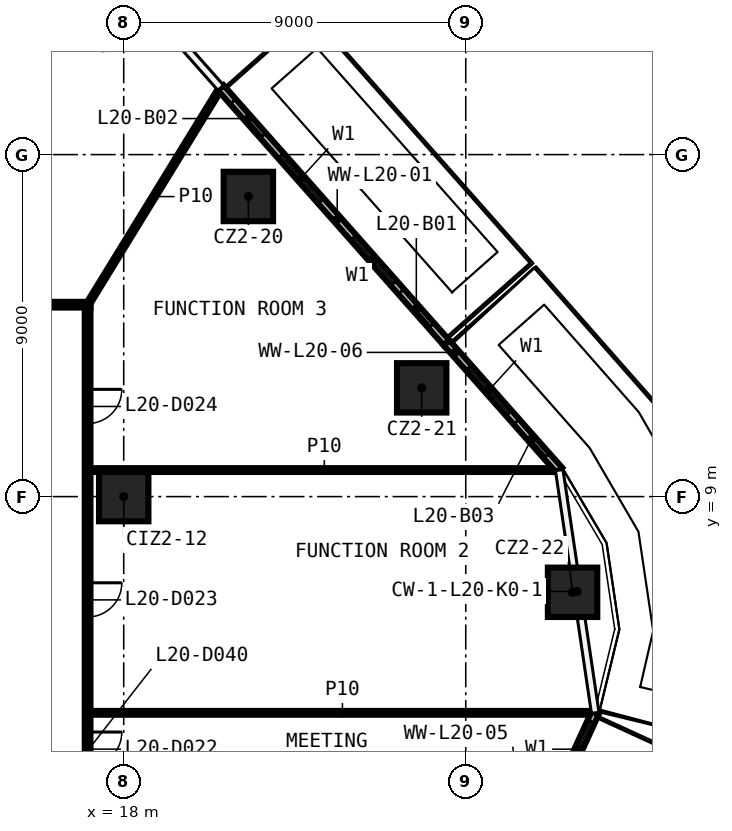
"""IFC4 building model, lengths in metres.
Left out: names, types, materials, properties, quantities, classifications, styles, units other than length and angle.
Written with IfcOpenShell. Run it as: python <this file> out.ifc"""

import sys

from ifc_helpers import new_model, si_unit, direction, frame, frame_2d, origin, origin_2d, place, context, subcontext, project, spatial, rectangle, extrude, element, fill, save


model = new_model("IFC4")
c1 = context("Model", 3, precision=1e-05, world=origin(), true_north=direction((0.0, 1.0)))
c2 = subcontext(c1, "Body", "Model", "MODEL_VIEW")
j1 = project(units=[si_unit("LENGTHUNIT", "METRE"), si_unit("PLANEANGLEUNIT", "RADIAN")], contexts=[c1])
p1 = place(None, origin())
s1 = spatial("IfcSite", under=j1, at=p1, CompositionType="ELEMENT")
p2 = place(p1, origin())
s2 = spatial("IfcBuilding", under=s1, at=p2, CompositionType="ELEMENT")
p3 = place(p2, frame((0.0, 0.0, 98.9)))
s3 = spatial("IfcBuildingStorey", under=s2, at=p3, CompositionType="ELEMENT", Elevation=98.9)
for number, where, z_axis, x_axis in (
    (1, (21.28, 16.898, 0.0), (0.0, 0.0, 1.0), (1.0, 0.0, 0.0)),
    (2, (25.841, 11.862, 0.0), (0.0, 0.0, 1.0), (1.0, 0.0, 0.0)),
    (3, (29.811, 6.482, 0.0), (0.0, 0.0, 1.0), (1.0, 0.0, 0.0)),
    (4, (18.0, 9.0, 0.0), (0.0, 0.0, 1.0), (1.0, 0.0, 0.0)),
):
    element("IfcColumn", number, at=place(p3, frame(where, z_axis=z_axis, x_axis=x_axis)), inside=s3, PredefinedType="COLUMN", context=c2, shape_type="SweptSolid", body=[
        extrude(rectangle(XDim=1.3, YDim=1.3, at=origin_2d()), origin(), (0.0, 0.0, 1.0), 3.25),
    ])
p4 = place(p3, frame((17.125, 3.31, 0.0), z_axis=(0.0, 0.0, 1.0), x_axis=(1.0, 0.0, 0.0)))
e5 = element("IfcWall", 5, at=p4, inside=s3, PredefinedType="PARTITIONING", context=c2, shape_type="SweptSolid", body=[
    extrude(rectangle(XDim=13.26, YDim=0.1, at=frame_2d((6.63, 0.0))), origin(), (0.0, 0.0, 1.0), 3.25),
])
p5 = place(p3, frame((17.125, 9.698, 0.0), z_axis=(0.0, 0.0, 1.0), x_axis=(1.0, 0.0, 0.0)))
e6 = element("IfcWall", 6, at=p5, inside=s3, PredefinedType="PARTITIONING", context=c2, shape_type="SweptSolid", body=[
    extrude(rectangle(XDim=12.308, YDim=0.1, at=frame_2d((6.154, 0.0))), origin(), (0.0, 0.0, 1.0), 3.25),
])
p6 = place(p3, frame((-17.125, 14.05, 0.0), z_axis=(0.0, 0.0, 1.0), x_axis=(1.0, 0.0, 0.0)))
e7 = element("IfcWall", 7, at=p6, inside=s3, PredefinedType="PARTITIONING", context=c2, shape_type="SweptSolid", body=[
    extrude(rectangle(XDim=34.25, YDim=0.15, at=frame_2d((17.125, 0.0))), origin(), (0.0, 0.0, 1.0), 3.25),
])
p7 = place(p6, frame((29.757, 0.0, 0.0)))
e8 = element("IfcOpeningElement", 8, at=p7, cuts=e7, PredefinedType="OPENING", context=c2, shape_type="SweptSolid", body=[
    extrude(rectangle(XDim=1.0, YDim=2.1, at=frame_2d((0.5, 1.05))), frame((0.0, 0.085, 0.0), z_axis=(0.0, -1.0, 0.0), x_axis=(1.0, 0.0, 0.0)), (0.0, 0.0, 1.0), 0.17),
])
p8 = place(p6, frame((18.682, 0.0, 0.0)))
e9 = element("IfcOpeningElement", 9, at=p8, cuts=e7, PredefinedType="OPENING", context=c2, shape_type="SweptSolid", body=[
    extrude(rectangle(XDim=1.0, YDim=2.1, at=frame_2d((0.5, 1.05))), frame((0.0, 0.085, 0.0), z_axis=(0.0, -1.0, 0.0), x_axis=(1.0, 0.0, 0.0)), (0.0, 0.0, 1.0), 0.17),
])
p9 = place(p6, frame((16.654, 0.0, 0.0)))
e10 = element("IfcOpeningElement", 10, at=p9, cuts=e7, PredefinedType="OPENING", context=c2, shape_type="SweptSolid", body=[
    extrude(rectangle(XDim=1.0, YDim=2.1, at=frame_2d((0.5, 1.05))), frame((0.0, 0.085, 0.0), z_axis=(0.0, -1.0, 0.0), x_axis=(1.0, 0.0, 0.0)), (0.0, 0.0, 1.0), 0.17),
])
p10 = place(p6, frame((9.827, 0.0, 0.0)))
e11 = element("IfcOpeningElement", 11, at=p10, cuts=e7, PredefinedType="OPENING", context=c2, shape_type="SweptSolid", body=[
    extrude(rectangle(XDim=1.0, YDim=2.1, at=frame_2d((0.5, 1.05))), frame((0.0, 0.085, 0.0), z_axis=(0.0, -1.0, 0.0), x_axis=(1.0, 0.0, 0.0)), (0.0, 0.0, 1.0), 0.17),
])
p11 = place(p6, frame((7.8, 0.0, 0.0)))
e12 = element("IfcOpeningElement", 12, at=p11, cuts=e7, PredefinedType="OPENING", context=c2, shape_type="SweptSolid", body=[
    extrude(rectangle(XDim=1.0, YDim=2.1, at=frame_2d((0.5, 1.05))), frame((0.0, 0.085, 0.0), z_axis=(0.0, -1.0, 0.0), x_axis=(1.0, 0.0, 0.0)), (0.0, 0.0, 1.0), 0.17),
])
p12 = place(p6, frame((2.56, 0.0, 0.0)))
e13 = element("IfcOpeningElement", 13, at=p12, cuts=e7, PredefinedType="OPENING", context=c2, shape_type="SweptSolid", body=[
    extrude(rectangle(XDim=0.9, YDim=2.1, at=frame_2d((0.45, 1.05))), frame((0.0, 0.085, 0.0), z_axis=(0.0, -1.0, 0.0), x_axis=(1.0, 0.0, 0.0)), (0.0, 0.0, 1.0), 0.17),
])
p13 = place(p3, frame((17.05, 14.05, 0.0), z_axis=(0.0, 0.0, 1.0), x_axis=(0.523105565691, 0.852267896346, 0.0)))
e14 = element("IfcWall", 14, at=p13, inside=s3, PredefinedType="PARTITIONING", context=c2, shape_type="SweptSolid", body=[
    extrude(rectangle(XDim=6.677, YDim=0.1, at=frame_2d((3.338, 0.0))), origin(), (0.0, 0.0, 1.0), 3.25),
])
p14 = place(p3, frame((17.05, 13.975, 0.0), z_axis=(0.0, 0.0, 1.0), x_axis=(0.0, -1.0, 0.0)))
e15 = element("IfcWall", 15, at=p14, inside=s3, PredefinedType="PARTITIONING", context=c2, shape_type="SweptSolid", body=[
    extrude(rectangle(XDim=27.95, YDim=0.15, at=frame_2d((13.975, 0.0))), origin(), (0.0, 0.0, 1.0), 3.25),
])
p15 = place(p14, frame((25.274, 0.0, 0.0)))
e16 = element("IfcOpeningElement", 16, at=p15, cuts=e15, PredefinedType="OPENING", context=c2, shape_type="SweptSolid", body=[
    extrude(rectangle(XDim=0.9, YDim=2.1, at=frame_2d((0.45, 1.05))), frame((0.0, 0.085, 0.0), z_axis=(0.0, -1.0, 0.0), x_axis=(1.0, 0.0, 0.0)), (0.0, 0.0, 1.0), 0.17),
])
p16 = place(p14, frame((18.854, 0.0, 0.0)))
e17 = element("IfcOpeningElement", 17, at=p16, cuts=e15, PredefinedType="OPENING", context=c2, shape_type="SweptSolid", body=[
    extrude(rectangle(XDim=1.0, YDim=2.1, at=frame_2d((0.5, 1.05))), frame((0.0, 0.085, 0.0), z_axis=(0.0, -1.0, 0.0), x_axis=(1.0, 0.0, 0.0)), (0.0, 0.0, 1.0), 0.17),
])
p17 = place(p14, frame((17.299, 0.0, 0.0)))
e18 = element("IfcOpeningElement", 18, at=p17, cuts=e15, PredefinedType="OPENING", context=c2, shape_type="SweptSolid", body=[
    extrude(rectangle(XDim=1.0, YDim=2.1, at=frame_2d((0.5, 1.05))), frame((0.0, 0.085, 0.0), z_axis=(0.0, -1.0, 0.0), x_axis=(1.0, 0.0, 0.0)), (0.0, 0.0, 1.0), 0.17),
])
p18 = place(p14, frame((11.171, 0.0, 0.0)))
e19 = element("IfcOpeningElement", 19, at=p18, cuts=e15, PredefinedType="OPENING", context=c2, shape_type="SweptSolid", body=[
    extrude(rectangle(XDim=0.9, YDim=2.1, at=frame_2d((0.45, 1.05))), frame((0.0, 0.085, 0.0), z_axis=(0.0, -1.0, 0.0), x_axis=(1.0, 0.0, 0.0)), (0.0, 0.0, 1.0), 0.17),
])
p19 = place(p14, frame((7.243, 0.0, 0.0)))
e20 = element("IfcOpeningElement", 20, at=p19, cuts=e15, PredefinedType="OPENING", context=c2, shape_type="SweptSolid", body=[
    extrude(rectangle(XDim=0.9, YDim=2.1, at=frame_2d((0.45, 1.05))), frame((0.0, 0.085, 0.0), z_axis=(0.0, -1.0, 0.0), x_axis=(1.0, 0.0, 0.0)), (0.0, 0.0, 1.0), 0.17),
])
p20 = place(p14, frame((2.153, 0.0, 0.0)))
e21 = element("IfcOpeningElement", 21, at=p20, cuts=e15, PredefinedType="OPENING", context=c2, shape_type="SweptSolid", body=[
    extrude(rectangle(XDim=0.9, YDim=2.1, at=frame_2d((0.45, 1.05))), frame((0.0, 0.085, 0.0), z_axis=(0.0, -1.0, 0.0), x_axis=(1.0, 0.0, 0.0)), (0.0, 0.0, 1.0), 0.17),
])
p21 = place(p3, frame((26.495, 13.046, 0.0), z_axis=(0.0, 0.0, 1.0), x_axis=(-0.662851206757, 0.748751145376, 0.0)))
e22 = element("IfcWall", 22, at=p21, inside=s3, PredefinedType="SOLIDWALL", context=c2, shape_type="SweptSolid", body=[
    extrude(rectangle(XDim=8.964, YDim=0.2, at=frame_2d((4.482, 0.0))), origin(), (0.0, 0.0, 1.0), 3.25),
])
p22 = place(p21, frame((2.1, 0.0, 0.6)))
e23 = element("IfcOpeningElement", 23, at=p22, cuts=e22, PredefinedType="OPENING", context=c2, shape_type="SweptSolid", body=[
    extrude(rectangle(XDim=1.6, YDim=2.4, at=frame_2d((0.8, 1.2))), frame((0.0, 0.11, 0.0), z_axis=(0.0, -1.0, 0.0), x_axis=(1.0, 0.0, 0.0)), (0.0, 0.0, 1.0), 0.22),
])
p23 = place(p21, frame((0.6, 0.0, 0.0)))
e24 = element("IfcOpeningElement", 24, at=p23, cuts=e22, PredefinedType="OPENING", context=c2, shape_type="SweptSolid", body=[
    extrude(rectangle(XDim=1.2, YDim=2.4, at=frame_2d((0.6, 1.2))), frame((0.0, 0.11, 0.0), z_axis=(0.0, -1.0, 0.0), x_axis=(1.0, 0.0, 0.0)), (0.0, 0.0, 1.0), 0.22),
])
p24 = place(p21, frame((4.982, 0.0, 0.6)))
e25 = element("IfcOpeningElement", 25, at=p24, cuts=e22, PredefinedType="OPENING", context=c2, shape_type="SweptSolid", body=[
    extrude(rectangle(XDim=1.6, YDim=2.4, at=frame_2d((0.8, 1.2))), frame((0.0, 0.11, 0.0), z_axis=(0.0, -1.0, 0.0), x_axis=(1.0, 0.0, 0.0)), (0.0, 0.0, 1.0), 0.22),
])
p25 = place(p21, frame((7.282, 0.0, 0.0)))
e26 = element("IfcOpeningElement", 26, at=p25, cuts=e22, PredefinedType="OPENING", context=c2, shape_type="SweptSolid", body=[
    extrude(rectangle(XDim=1.2, YDim=2.4, at=frame_2d((0.6, 1.2))), frame((0.0, 0.11, 0.0), z_axis=(0.0, -1.0, 0.0), x_axis=(1.0, 0.0, 0.0)), (0.0, 0.0, 1.0), 0.22),
])
p26 = place(p3, frame((29.46, 9.698, 0.0), z_axis=(0.0, 0.0, 1.0), x_axis=(-0.662868291848, 0.748736020011, 0.0)))
e27 = element("IfcWall", 27, at=p26, inside=s3, PredefinedType="SOLIDWALL", context=c2, shape_type="SweptSolid", body=[
    extrude(rectangle(XDim=4.472, YDim=0.2, at=frame_2d((2.236, 0.0))), origin(), (0.0, 0.0, 1.0), 3.25),
])
p27 = place(p26, frame((2.0, 0.0, 0.6)))
e28 = element("IfcOpeningElement", 28, at=p27, cuts=e27, PredefinedType="OPENING", context=c2, shape_type="SweptSolid", body=[
    extrude(rectangle(XDim=1.6, YDim=2.4, at=frame_2d((0.8, 1.2))), frame((0.0, 0.11, 0.0), z_axis=(0.0, -1.0, 0.0), x_axis=(1.0, 0.0, 0.0)), (0.0, 0.0, 1.0), 0.22),
])
p28 = place(p26, frame((0.5, 0.0, 0.0)))
e29 = element("IfcOpeningElement", 29, at=p28, cuts=e27, PredefinedType="OPENING", context=c2, shape_type="SweptSolid", body=[
    extrude(rectangle(XDim=1.2, YDim=2.4, at=frame_2d((0.6, 1.2))), frame((0.0, 0.11, 0.0), z_axis=(0.0, -1.0, 0.0), x_axis=(1.0, 0.0, 0.0)), (0.0, 0.0, 1.0), 0.22),
])
p29 = place(p3, frame((21.329, -16.468, 0.0), z_axis=(0.0, 0.0, 1.0), x_axis=(0.417117833448, 0.908852415423, 0.0)))
e30 = element("IfcWall", 30, at=p29, inside=s3, PredefinedType="SOLIDWALL", context=c2, shape_type="SweptSolid", body=[
    extrude(rectangle(XDim=21.761, YDim=0.2, at=frame_2d((10.881, 0.0))), origin(), (0.0, 0.0, 1.0), 3.25),
])
p30 = place(p29, frame((2.0, 0.0, 0.6)))
e31 = element("IfcOpeningElement", 31, at=p30, cuts=e30, PredefinedType="OPENING", context=c2, shape_type="SweptSolid", body=[
    extrude(rectangle(XDim=1.6, YDim=2.4, at=frame_2d((0.8, 1.2))), frame((0.0, 0.11, 0.0), z_axis=(0.0, -1.0, 0.0), x_axis=(1.0, 0.0, 0.0)), (0.0, 0.0, 1.0), 0.22),
])
p31 = place(p29, frame((0.5, 0.0, 0.0)))
e32 = element("IfcOpeningElement", 32, at=p31, cuts=e30, PredefinedType="OPENING", context=c2, shape_type="SweptSolid", body=[
    extrude(rectangle(XDim=1.2, YDim=2.4, at=frame_2d((0.6, 1.2))), frame((0.0, 0.11, 0.0), z_axis=(0.0, -1.0, 0.0), x_axis=(1.0, 0.0, 0.0)), (0.0, 0.0, 1.0), 0.22),
])
p32 = place(p29, frame((6.352, 0.0, 0.6)))
e33 = element("IfcOpeningElement", 33, at=p32, cuts=e30, PredefinedType="OPENING", context=c2, shape_type="SweptSolid", body=[
    extrude(rectangle(XDim=1.6, YDim=2.4, at=frame_2d((0.8, 1.2))), frame((0.0, 0.11, 0.0), z_axis=(0.0, -1.0, 0.0), x_axis=(1.0, 0.0, 0.0)), (0.0, 0.0, 1.0), 0.22),
])
p33 = place(p29, frame((4.852, 0.0, 0.0)))
e34 = element("IfcOpeningElement", 34, at=p33, cuts=e30, PredefinedType="OPENING", context=c2, shape_type="SweptSolid", body=[
    extrude(rectangle(XDim=1.2, YDim=2.4, at=frame_2d((0.6, 1.2))), frame((0.0, 0.11, 0.0), z_axis=(0.0, -1.0, 0.0), x_axis=(1.0, 0.0, 0.0)), (0.0, 0.0, 1.0), 0.22),
])
p34 = place(p29, frame((9.205, 0.0, 0.6)))
e35 = element("IfcOpeningElement", 35, at=p34, cuts=e30, PredefinedType="OPENING", context=c2, shape_type="SweptSolid", body=[
    extrude(rectangle(XDim=1.6, YDim=2.4, at=frame_2d((0.8, 1.2))), frame((0.0, 0.11, 0.0), z_axis=(0.0, -1.0, 0.0), x_axis=(1.0, 0.0, 0.0)), (0.0, 0.0, 1.0), 0.22),
])
p35 = place(p29, frame((11.205, 0.0, 0.0)))
e36 = element("IfcOpeningElement", 36, at=p35, cuts=e30, PredefinedType="OPENING", context=c2, shape_type="SweptSolid", body=[
    extrude(rectangle(XDim=1.2, YDim=2.4, at=frame_2d((0.6, 1.2))), frame((0.0, 0.11, 0.0), z_axis=(0.0, -1.0, 0.0), x_axis=(1.0, 0.0, 0.0)), (0.0, 0.0, 1.0), 0.22),
])
p36 = place(p29, frame((15.057, 0.0, 0.6)))
e37 = element("IfcOpeningElement", 37, at=p36, cuts=e30, PredefinedType="OPENING", context=c2, shape_type="SweptSolid", body=[
    extrude(rectangle(XDim=1.6, YDim=2.4, at=frame_2d((0.8, 1.2))), frame((0.0, 0.11, 0.0), z_axis=(0.0, -1.0, 0.0), x_axis=(1.0, 0.0, 0.0)), (0.0, 0.0, 1.0), 0.22),
])
p37 = place(p29, frame((13.557, 0.0, 0.0)))
e38 = element("IfcOpeningElement", 38, at=p37, cuts=e30, PredefinedType="OPENING", context=c2, shape_type="SweptSolid", body=[
    extrude(rectangle(XDim=1.2, YDim=2.4, at=frame_2d((0.6, 1.2))), frame((0.0, 0.11, 0.0), z_axis=(0.0, -1.0, 0.0), x_axis=(1.0, 0.0, 0.0)), (0.0, 0.0, 1.0), 0.22),
])
p38 = place(p29, frame((19.909, 0.0, 0.6)))
e39 = element("IfcOpeningElement", 39, at=p38, cuts=e30, PredefinedType="OPENING", context=c2, shape_type="SweptSolid", body=[
    extrude(rectangle(XDim=1.6, YDim=2.4, at=frame_2d((0.8, 1.2))), frame((0.0, 0.11, 0.0), z_axis=(0.0, -1.0, 0.0), x_axis=(1.0, 0.0, 0.0)), (0.0, 0.0, 1.0), 0.22),
])
p39 = place(p29, frame((18.409, 0.0, 0.0)))
e40 = element("IfcOpeningElement", 40, at=p39, cuts=e30, PredefinedType="OPENING", context=c2, shape_type="SweptSolid", body=[
    extrude(rectangle(XDim=1.2, YDim=2.4, at=frame_2d((0.6, 1.2))), frame((0.0, 0.11, 0.0), z_axis=(0.0, -1.0, 0.0), x_axis=(1.0, 0.0, 0.0)), (0.0, 0.0, 1.0), 0.22),
])
p40 = place(p18, origin())
e41 = element("IfcDoor", 41, at=p40, inside=s3, OperationType="SINGLE_SWING_RIGHT", PredefinedType="DOOR", context=c2, shape_type="SweptSolid", body=[
    extrude(rectangle(XDim=0.9, YDim=2.1, at=frame_2d((0.45, 1.05))), frame((0.0, 0.025, 0.0), z_axis=(0.0, -1.0, 0.0), x_axis=(1.0, 0.0, 0.0)), (0.0, 0.0, 1.0), 0.05),
])
fill(e19, e41)
p41 = place(p19, origin())
e42 = element("IfcDoor", 42, at=p41, inside=s3, OperationType="SINGLE_SWING_LEFT", PredefinedType="DOOR", context=c2, shape_type="SweptSolid", body=[
    extrude(rectangle(XDim=0.9, YDim=2.1, at=frame_2d((0.45, 1.05))), frame((0.0, 0.025, 0.0), z_axis=(0.0, -1.0, 0.0), x_axis=(1.0, 0.0, 0.0)), (0.0, 0.0, 1.0), 0.05),
])
fill(e20, e42)
p42 = place(p20, origin())
e43 = element("IfcDoor", 43, at=p42, inside=s3, OperationType="SINGLE_SWING_RIGHT", PredefinedType="DOOR", context=c2, shape_type="SweptSolid", body=[
    extrude(rectangle(XDim=0.9, YDim=2.1, at=frame_2d((0.45, 1.05))), frame((0.0, 0.025, 0.0), z_axis=(0.0, -1.0, 0.0), x_axis=(1.0, 0.0, 0.0)), (0.0, 0.0, 1.0), 0.05),
])
fill(e21, e43)
p43 = place(p22, origin())
e44 = element("IfcWindow", 44, at=p43, inside=s3, PartitioningType="SINGLE_PANEL", PredefinedType="WINDOW", context=c2, shape_type="SweptSolid", body=[
    extrude(rectangle(XDim=1.6, YDim=2.4, at=frame_2d((0.8, 1.2))), frame((0.0, 0.03, 0.0), z_axis=(0.0, -1.0, 0.0), x_axis=(1.0, 0.0, 0.0)), (0.0, 0.0, 1.0), 0.06),
])
fill(e23, e44)
p44 = place(p23, origin())
e45 = element("IfcDoor", 45, at=p44, inside=s3, OperationType="SLIDING_TO_LEFT", PredefinedType="DOOR", context=c2, shape_type="SweptSolid", body=[
    extrude(rectangle(XDim=1.2, YDim=2.4, at=frame_2d((0.6, 1.2))), frame((0.0, 0.025, 0.0), z_axis=(0.0, -1.0, 0.0), x_axis=(1.0, 0.0, 0.0)), (0.0, 0.0, 1.0), 0.05),
])
fill(e24, e45)
p45 = place(p24, origin())
e46 = element("IfcWindow", 46, at=p45, inside=s3, PartitioningType="SINGLE_PANEL", PredefinedType="WINDOW", context=c2, shape_type="SweptSolid", body=[
    extrude(rectangle(XDim=1.6, YDim=2.4, at=frame_2d((0.8, 1.2))), frame((0.0, 0.03, 0.0), z_axis=(0.0, -1.0, 0.0), x_axis=(1.0, 0.0, 0.0)), (0.0, 0.0, 1.0), 0.06),
])
fill(e25, e46)
p46 = place(p25, origin())
e47 = element("IfcDoor", 47, at=p46, inside=s3, OperationType="SLIDING_TO_LEFT", PredefinedType="DOOR", context=c2, shape_type="SweptSolid", body=[
    extrude(rectangle(XDim=1.2, YDim=2.4, at=frame_2d((0.6, 1.2))), frame((0.0, 0.025, 0.0), z_axis=(0.0, -1.0, 0.0), x_axis=(1.0, 0.0, 0.0)), (0.0, 0.0, 1.0), 0.05),
])
fill(e26, e47)
p47 = place(p27, origin())
e48 = element("IfcWindow", 48, at=p47, inside=s3, PartitioningType="SINGLE_PANEL", PredefinedType="WINDOW", context=c2, shape_type="SweptSolid", body=[
    extrude(rectangle(XDim=1.6, YDim=2.4, at=frame_2d((0.8, 1.2))), frame((0.0, 0.03, 0.0), z_axis=(0.0, -1.0, 0.0), x_axis=(1.0, 0.0, 0.0)), (0.0, 0.0, 1.0), 0.06),
])
fill(e28, e48)
p48 = place(p28, origin())
e49 = element("IfcDoor", 49, at=p48, inside=s3, OperationType="SLIDING_TO_LEFT", PredefinedType="DOOR", context=c2, shape_type="SweptSolid", body=[
    extrude(rectangle(XDim=1.2, YDim=2.4, at=frame_2d((0.6, 1.2))), frame((0.0, 0.025, 0.0), z_axis=(0.0, -1.0, 0.0), x_axis=(1.0, 0.0, 0.0)), (0.0, 0.0, 1.0), 0.05),
])
fill(e29, e49)
p49 = place(p38, origin())
e50 = element("IfcWindow", 50, at=p49, inside=s3, PartitioningType="SINGLE_PANEL", PredefinedType="WINDOW", context=c2, shape_type="SweptSolid", body=[
    extrude(rectangle(XDim=1.6, YDim=2.4, at=frame_2d((0.8, 1.2))), frame((0.0, 0.03, 0.0), z_axis=(0.0, -1.0, 0.0), x_axis=(1.0, 0.0, 0.0)), (0.0, 0.0, 1.0), 0.06),
])
fill(e39, e50)
save(model, sys.argv[1])
